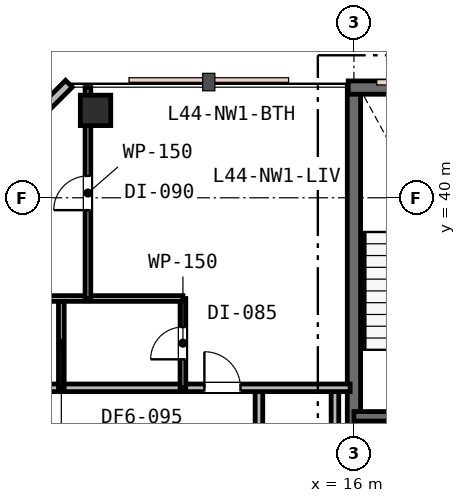
"""IFC4 building model, lengths in metres.
Left out: names, types, materials, properties, quantities, classifications, styles, units other than length and angle.
Written with IfcOpenShell. Run it as: python <this file> out.ifc"""

import sys

from ifc_helpers import new_model, si_unit, direction, frame, frame_2d, origin, origin_2d, place, context, subcontext, project, spatial, rectangle, extrude, element, fill, save


model = new_model("IFC4")
c1 = context("Model", 3, precision=1e-05, world=origin(), true_north=direction((0.0, 1.0)))
c2 = subcontext(c1, "Body", "Model", "MODEL_VIEW")
j1 = project(units=[si_unit("LENGTHUNIT", "METRE"), si_unit("PLANEANGLEUNIT", "RADIAN")], contexts=[c1])
p1 = place(None, origin())
s1 = spatial("IfcSite", under=j1, at=p1, CompositionType="ELEMENT")
p2 = place(p1, origin())
s2 = spatial("IfcBuilding", under=s1, at=p2, CompositionType="ELEMENT")
p3 = place(p2, frame((0.0, 0.0, 172.2)))
s3 = spatial("IfcBuildingStorey", under=s2, at=p3, CompositionType="ELEMENT", Elevation=172.2)
p4 = place(p3, frame((16.0, 30.65, 0.0), z_axis=(0.0, 0.0, 1.0), x_axis=(0.0, 1.0, 0.0)))
e1 = element("IfcWall", 1, at=p4, inside=s3, PredefinedType="SHEAR", context=c2, shape_type="SweptSolid", body=[
    extrude(rectangle(XDim=12.3, YDim=0.35, at=frame_2d((6.15, 0.0))), origin(), (0.0, 0.0, 1.0), 3.6),
])
p5 = place(p3, frame((15.85, 42.9, 0.0), z_axis=(0.0, 0.0, 1.0), x_axis=(1.0, 0.0, 0.0)))
e2 = element("IfcWall", 2, at=p5, inside=s3, PredefinedType="SHEAR", context=c2, shape_type="SweptSolid", body=[
    extrude(rectangle(XDim=24.3, YDim=0.35, at=frame_2d((12.15, 0.0))), origin(), (0.0, 0.0, 1.0), 3.6),
])
p6 = place(p3, frame((16.0, 34.25, 0.0), z_axis=(0.0, 0.0, 1.0), x_axis=(1.0, 0.0, 0.0)))
e3 = element("IfcWall", 3, at=p6, inside=s3, PredefinedType="SHEAR", context=c2, shape_type="SweptSolid", body=[
    extrude(rectangle(XDim=6.05, YDim=0.25, at=frame_2d((3.025, 0.0))), origin(), (0.0, 0.0, 1.0), 3.6),
])
p7 = place(p6, frame((1.25, 0.0, 0.0)))
e4 = element("IfcOpeningElement", 4, at=p7, cuts=e3, PredefinedType="OPENING", context=c2, shape_type="SweptSolid", body=[
    extrude(rectangle(XDim=1.0, YDim=2.15, at=frame_2d((0.5, 1.075))), frame((0.0, 0.135, 0.0), z_axis=(0.0, -1.0, 0.0), x_axis=(1.0, 0.0, 0.0)), (0.0, 0.0, 1.0), 0.27),
])
p8 = place(p6, frame((4.2, 0.0, 0.0)))
e5 = element("IfcOpeningElement", 5, at=p8, cuts=e3, PredefinedType="OPENING", context=c2, shape_type="SweptSolid", body=[
    extrude(rectangle(XDim=1.1, YDim=2.15, at=frame_2d((0.55, 1.075))), frame((0.0, 0.135, 0.0), z_axis=(0.0, -1.0, 0.0), x_axis=(1.0, 0.0, 0.0)), (0.0, 0.0, 1.0), 0.27),
])
p9 = place(p3, frame((9.2, 42.3, 0.0), z_axis=(0.0, 0.0, 1.0), x_axis=(1.0, 0.0, 0.0)))
e6 = element("IfcColumn", 6, at=p9, inside=s3, PredefinedType="COLUMN", context=c2, shape_type="SweptSolid", body=[
    extrude(rectangle(XDim=0.8, YDim=0.8, at=origin_2d()), origin(), (0.0, 0.0, 1.0), 3.6),
])
p10 = place(p3, frame((8.5, 43.0, 0.0), z_axis=(0.0, 0.0, 1.0), x_axis=(-0.707106781187, -0.707106781187, 0.0)))
e7 = element("IfcWall", 7, at=p10, inside=s3, PredefinedType="STANDARD", context=c2, shape_type="SweptSolid", body=[
    extrude(rectangle(XDim=4.95, YDim=0.25, at=frame_2d((2.475, 0.0))), origin(), (0.0, 0.0, 1.0), 3.33),
])
p11 = place(p10, frame((1.875, 0.0, 0.85)))
e8 = element("IfcOpeningElement", 8, at=p11, cuts=e7, PredefinedType="OPENING", context=c2, shape_type="SweptSolid", body=[
    extrude(rectangle(XDim=1.2, YDim=1.6, at=frame_2d((0.6, 0.8))), frame((0.0, 0.135, 0.0), z_axis=(0.0, -1.0, 0.0), x_axis=(1.0, 0.0, 0.0)), (0.0, 0.0, 1.0), 0.27),
])
p12 = place(p3, frame((15.5, 30.8, 0.0), z_axis=(0.0, 0.0, 1.0), x_axis=(0.0, 1.0, 0.0)))
e9 = element("IfcWall", 9, at=p12, inside=s3, PredefinedType="PARTITIONING", context=c2, shape_type="SweptSolid", body=[
    extrude(rectangle(XDim=4.2, YDim=0.2, at=frame_2d((2.1, 0.0))), origin(), (0.0, 0.0, 1.0), 2.92),
])
p13 = place(p3, frame((13.5, 17.0, 0.0), z_axis=(0.0, 0.0, 1.0), x_axis=(0.0, 1.0, 0.0)))
e10 = element("IfcWall", 10, at=p13, inside=s3, PredefinedType="PARTITIONING", context=c2, shape_type="SweptSolid", body=[
    extrude(rectangle(XDim=18.0, YDim=0.2, at=frame_2d((9.0, 0.0))), origin(), (0.0, 0.0, 1.0), 2.92),
])
p14 = place(p13, frame((15.425, 0.0, 0.0)))
e11 = element("IfcOpeningElement", 11, at=p14, cuts=e10, PredefinedType="OPENING", context=c2, shape_type="SweptSolid", body=[
    extrude(rectangle(XDim=0.95, YDim=2.15, at=frame_2d((0.475, 1.075))), frame((0.0, 0.11, 0.0), z_axis=(0.0, -1.0, 0.0), x_axis=(1.0, 0.0, 0.0)), (0.0, 0.0, 1.0), 0.22),
])
p15 = place(p13, frame((10.225, 0.0, 0.0)))
e12 = element("IfcOpeningElement", 12, at=p15, cuts=e10, PredefinedType="OPENING", context=c2, shape_type="SweptSolid", body=[
    extrude(rectangle(XDim=0.95, YDim=2.15, at=frame_2d((0.475, 1.075))), frame((0.0, 0.11, 0.0), z_axis=(0.0, -1.0, 0.0), x_axis=(1.0, 0.0, 0.0)), (0.0, 0.0, 1.0), 0.22),
])
p16 = place(p3, frame((5.1, 35.0, 0.0), z_axis=(0.0, 0.0, 1.0), x_axis=(1.0, 0.0, 0.0)))
e13 = element("IfcWall", 13, at=p16, inside=s3, PredefinedType="PARTITIONING", context=c2, shape_type="SweptSolid", body=[
    extrude(rectangle(XDim=10.8, YDim=0.2, at=frame_2d((5.4, 0.0))), origin(), (0.0, 0.0, 1.0), 3.02),
])
p17 = place(p16, frame((6.964, 0.0, 0.0)))
e14 = element("IfcOpeningElement", 14, at=p17, cuts=e13, PredefinedType="OPENING", context=c2, shape_type="SweptSolid", body=[
    extrude(rectangle(XDim=0.95, YDim=2.15, at=frame_2d((0.475, 1.075))), frame((0.0, 0.11, 0.0), z_axis=(0.0, -1.0, 0.0), x_axis=(1.0, 0.0, 0.0)), (0.0, 0.0, 1.0), 0.22),
])
p18 = place(p3, frame((11.5, 35.0, 0.0), z_axis=(0.0, 0.0, 1.0), x_axis=(0.0, 1.0, 0.0)))
e15 = element("IfcWall", 15, at=p18, inside=s3, PredefinedType="PARTITIONING", context=c2, shape_type="SweptSolid", body=[
    extrude(rectangle(XDim=2.35, YDim=0.15, at=frame_2d((1.175, 0.0))), origin(), (0.0, 0.0, 1.0), 3.33),
])
p19 = place(p18, frame((0.75, 0.0, 0.0)))
e16 = element("IfcOpeningElement", 16, at=p19, cuts=e15, PredefinedType="OPENING", context=c2, shape_type="SweptSolid", body=[
    extrude(rectangle(XDim=0.85, YDim=2.15, at=frame_2d((0.425, 1.075))), frame((0.0, 0.085, 0.0), z_axis=(0.0, -1.0, 0.0), x_axis=(1.0, 0.0, 0.0)), (0.0, 0.0, 1.0), 0.17),
])
p20 = place(p3, frame((8.3, 35.0, 0.0), z_axis=(0.0, 0.0, 1.0), x_axis=(0.0, 1.0, 0.0)))
e17 = element("IfcWall", 17, at=p20, inside=s3, PredefinedType="PARTITIONING", context=c2, shape_type="SweptSolid", body=[
    extrude(rectangle(XDim=2.35, YDim=0.15, at=frame_2d((1.175, 0.0))), origin(), (0.0, 0.0, 1.0), 3.33),
])
p21 = place(p3, frame((5.1, 37.35, 0.0), z_axis=(0.0, 0.0, 1.0), x_axis=(1.0, 0.0, 0.0)))
e18 = element("IfcWall", 18, at=p21, inside=s3, PredefinedType="PARTITIONING", context=c2, shape_type="SweptSolid", body=[
    extrude(rectangle(XDim=6.4, YDim=0.15, at=frame_2d((3.2, 0.0))), origin(), (0.0, 0.0, 1.0), 3.02),
])
p22 = place(p21, frame((1.78, 0.0, 0.0)))
e19 = element("IfcOpeningElement", 19, at=p22, cuts=e18, PredefinedType="OPENING", context=c2, shape_type="SweptSolid", body=[
    extrude(rectangle(XDim=0.85, YDim=2.15, at=frame_2d((0.425, 1.075))), frame((0.0, 0.085, 0.0), z_axis=(0.0, -1.0, 0.0), x_axis=(1.0, 0.0, 0.0)), (0.0, 0.0, 1.0), 0.17),
])
p23 = place(p3, frame((9.0, 37.35, 0.0), z_axis=(0.0, 0.0, 1.0), x_axis=(0.0, 1.0, 0.0)))
e20 = element("IfcWall", 20, at=p23, inside=s3, PredefinedType="PARTITIONING", context=c2, shape_type="SweptSolid", body=[
    extrude(rectangle(XDim=5.55, YDim=0.15, at=frame_2d((2.775, 0.0))), origin(), (0.0, 0.0, 1.0), 3.02),
])
p24 = place(p23, frame((2.325, 0.0, 0.0)))
e21 = element("IfcOpeningElement", 21, at=p24, cuts=e20, PredefinedType="OPENING", context=c2, shape_type="SweptSolid", body=[
    extrude(rectangle(XDim=0.9, YDim=2.15, at=frame_2d((0.45, 1.075))), frame((0.0, 0.085, 0.0), z_axis=(0.0, -1.0, 0.0), x_axis=(1.0, 0.0, 0.0)), (0.0, 0.0, 1.0), 0.17),
])
p25 = place(p17, origin())
e22 = element("IfcDoor", 22, at=p25, inside=s3, OperationType="SINGLE_SWING_LEFT", PredefinedType="DOOR", context=c2, shape_type="SweptSolid", body=[
    extrude(rectangle(XDim=0.95, YDim=2.15, at=frame_2d((0.475, 1.075))), frame((0.0, 0.025, 0.0), z_axis=(0.0, -1.0, 0.0), x_axis=(1.0, 0.0, 0.0)), (0.0, 0.0, 1.0), 0.05),
])
fill(e14, e22)
p26 = place(p19, origin())
e23 = element("IfcDoor", 23, at=p26, inside=s3, OperationType="SINGLE_SWING_LEFT", PredefinedType="DOOR", context=c2, shape_type="SweptSolid", body=[
    extrude(rectangle(XDim=0.85, YDim=2.15, at=frame_2d((0.425, 1.075))), frame((0.0, 0.025, 0.0), z_axis=(0.0, -1.0, 0.0), x_axis=(1.0, 0.0, 0.0)), (0.0, 0.0, 1.0), 0.05),
])
fill(e16, e23)
p27 = place(p24, origin())
e24 = element("IfcDoor", 24, at=p27, inside=s3, OperationType="SINGLE_SWING_LEFT", PredefinedType="DOOR", context=c2, shape_type="SweptSolid", body=[
    extrude(rectangle(XDim=0.9, YDim=2.15, at=frame_2d((0.45, 1.075))), frame((0.0, 0.025, 0.0), z_axis=(0.0, -1.0, 0.0), x_axis=(1.0, 0.0, 0.0)), (0.0, 0.0, 1.0), 0.05),
])
fill(e21, e24)
save(model, sys.argv[1])
